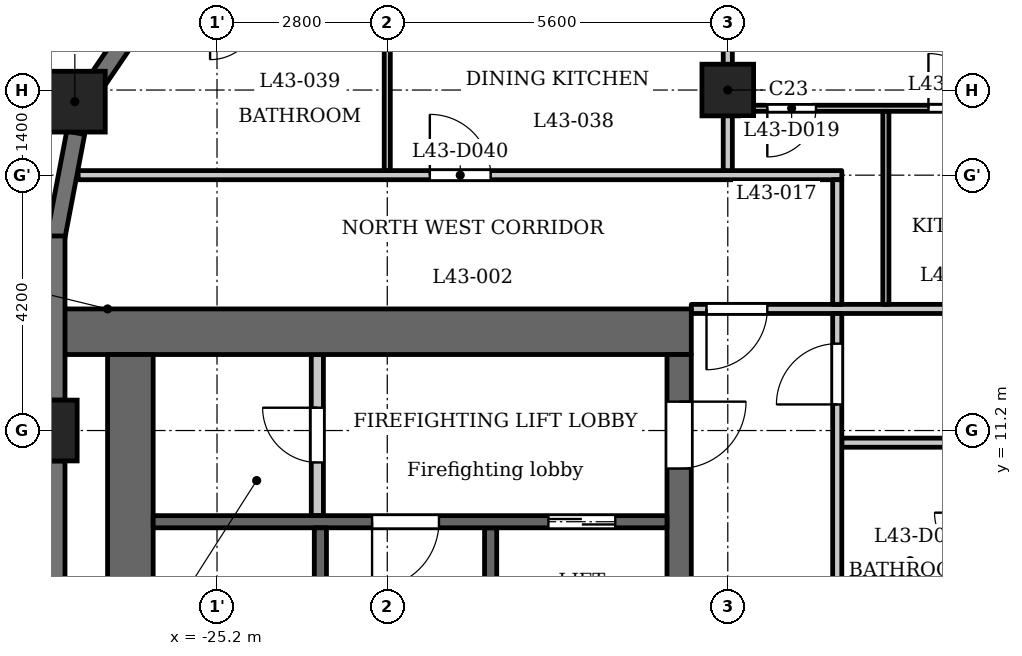
"""IFC4 building model, lengths in metres.
Left out: names, types, materials, properties, quantities, classifications, styles, units other than length and angle.
Written with IfcOpenShell. Run it as: python <this file> out.ifc"""

import sys

from ifc_helpers import new_model, si_unit, direction, frame, frame_2d, origin, origin_2d, place, context, subcontext, project, spatial, rectangle, extrude, element, fill, save


model = new_model("IFC4")
c1 = context("Model", 3, precision=1e-05, world=origin(), true_north=direction((0.0, 1.0)))
c2 = subcontext(c1, "Body", "Model", "MODEL_VIEW")
j1 = project(units=[si_unit("LENGTHUNIT", "METRE"), si_unit("PLANEANGLEUNIT", "RADIAN")], contexts=[c1])
p1 = place(None, origin())
s1 = spatial("IfcSite", under=j1, at=p1, CompositionType="ELEMENT")
p2 = place(p1, origin())
s2 = spatial("IfcBuilding", under=s1, at=p2, CompositionType="ELEMENT")
p3 = place(p2, frame((0.0, 0.0, 167.6)))
s3 = spatial("IfcBuildingStorey", under=s2, at=p3, CompositionType="ELEMENT", Elevation=167.6)
for number, where, z_axis, x_axis in (
    (1, (-27.538, 16.609, 0.0), (0.0, 0.0, 1.0), (1.0, 0.0, 0.0)),
    (2, (-28.0, 11.2, 0.0), (0.0, 0.0, 1.0), (1.0, 0.0, 0.0)),
):
    element("IfcColumn", number, at=place(p3, frame(where, z_axis=z_axis, x_axis=x_axis)), inside=s3, PredefinedType="COLUMN", context=c2, shape_type="SweptSolid", body=[
        extrude(rectangle(XDim=1.0, YDim=1.0, at=origin_2d()), origin(), (0.0, 0.0, 1.0), 3.5),
    ])
p4 = place(p3, frame((-16.8, 16.8, 0.0), z_axis=(0.0, 0.0, 1.0), x_axis=(1.0, 0.0, 0.0)))
e3 = element("IfcColumn", 3, at=p4, inside=s3, PredefinedType="COLUMN", context=c2, shape_type="SweptSolid", body=[
    extrude(rectangle(XDim=0.85, YDim=0.85, at=origin_2d()), origin(), (0.0, 0.0, 1.0), 3.5),
])
p5 = place(p3, frame((-26.504, 17.934, 0.0), z_axis=(0.0, 0.0, 1.0), x_axis=(-0.562145470373, -0.827038372833, 0.0)))
e4 = element("IfcWall", 4, at=p5, inside=s3, PredefinedType="SOLIDWALL", context=c2, shape_type="SweptSolid", body=[
    extrude(rectangle(XDim=1.177, YDim=0.3, at=frame_2d((0.588, 0.0))), origin(), (0.0, 0.0, 1.0), 3.2),
])
p6 = place(p3, frame((-27.524, 16.097, 0.0), z_axis=(0.0, 0.0, 1.0), x_axis=(-0.187259034321, -0.982310569049, 0.0)))
e5 = element("IfcWall", 5, at=p6, inside=s3, PredefinedType="SOLIDWALL", context=c2, shape_type="SweptSolid", body=[
    extrude(rectangle(XDim=1.756, YDim=0.3, at=frame_2d((0.878, 0.0))), origin(), (0.0, 0.0, 1.0), 2.45),
])
p7 = place(p3, frame((-27.85, 14.4, 0.0), z_axis=(0.0, 0.0, 1.0), x_axis=(0.0, -1.0, 0.0)))
e6 = element("IfcWall", 6, at=p7, inside=s3, PredefinedType="SOLIDWALL", context=c2, shape_type="SweptSolid", body=[
    extrude(rectangle(XDim=2.7, YDim=0.3, at=frame_2d((1.35, 0.0))), origin(), (0.0, 0.0, 1.0), 2.45),
])
p8 = place(p3, frame((-27.85, 10.7, 0.0), z_axis=(0.0, 0.0, 1.0), x_axis=(0.0, -1.0, 0.0)))
e7 = element("IfcWall", 7, at=p8, inside=s3, PredefinedType="SOLIDWALL", context=c2, shape_type="SweptSolid", body=[
    extrude(rectangle(XDim=4.6, YDim=0.3, at=frame_2d((2.3, 0.0))), origin(), (0.0, 0.0, 1.0), 2.45),
])
p9 = place(p3, frame((-20.7, 2.6, 0.0), z_axis=(0.0, 0.0, 1.0), x_axis=(0.0, 1.0, 0.0)))
e8 = element("IfcWall", 8, at=p9, inside=s3, PredefinedType="SHEAR", context=c2, shape_type="SweptSolid", body=[
    extrude(rectangle(XDim=7.0, YDim=0.2, at=frame_2d((3.5, 0.0))), origin(), (0.0, 0.0, 1.0), 3.2),
])
p10 = place(p3, frame((-17.4, 12.825, 0.0), z_axis=(0.0, 0.0, 1.0), x_axis=(-1.0, 0.0, 0.0)))
e9 = element("IfcWall", 9, at=p10, inside=s3, PredefinedType="SHEAR", context=c2, shape_type="SweptSolid", body=[
    extrude(rectangle(XDim=10.4, YDim=0.75, at=frame_2d((5.2, 0.0))), origin(), (0.0, 0.0, 1.0), 3.2),
])
p11 = place(p3, frame((-17.6, -12.45, 0.0), z_axis=(0.0, 0.0, 1.0), x_axis=(0.0, 1.0, 0.0)))
e10 = element("IfcWall", 10, at=p11, inside=s3, PredefinedType="SHEAR", context=c2, shape_type="SweptSolid", body=[
    extrude(rectangle(XDim=24.9, YDim=0.4, at=frame_2d((12.45, 0.0))), origin(), (0.0, 0.0, 1.0), 3.2),
])
p12 = place(p11, frame((8.65, 0.0, 0.0)))
e11 = element("IfcOpeningElement", 11, at=p12, cuts=e10, PredefinedType="OPENING", context=c2, shape_type="SweptSolid", body=[
    extrude(rectangle(XDim=0.9, YDim=2.1, at=frame_2d((0.45, 1.05))), frame((0.0, 0.21, 0.0), z_axis=(0.0, -1.0, 0.0), x_axis=(1.0, 0.0, 0.0)), (0.0, 0.0, 1.0), 0.42),
])
p13 = place(p11, frame((15.6, 0.0, 0.0)))
e12 = element("IfcOpeningElement", 12, at=p13, cuts=e10, PredefinedType="OPENING", context=c2, shape_type="SweptSolid", body=[
    extrude(rectangle(XDim=1.1, YDim=2.1, at=frame_2d((0.55, 1.05))), frame((0.0, 0.21, 0.0), z_axis=(0.0, -1.0, 0.0), x_axis=(1.0, 0.0, 0.0)), (0.0, 0.0, 1.0), 0.42),
])
p14 = place(p11, frame((18.0, 0.0, 0.0)))
e13 = element("IfcOpeningElement", 13, at=p14, cuts=e10, PredefinedType="OPENING", context=c2, shape_type="SweptSolid", body=[
    extrude(rectangle(XDim=1.1, YDim=2.1, at=frame_2d((0.55, 1.05))), frame((0.0, 0.21, 0.0), z_axis=(0.0, -1.0, 0.0), x_axis=(1.0, 0.0, 0.0)), (0.0, 0.0, 1.0), 0.42),
])
p15 = place(p11, frame((23.025, 0.0, 0.0)))
e14 = element("IfcOpeningElement", 14, at=p15, cuts=e10, PredefinedType="OPENING", context=c2, shape_type="SweptSolid", body=[
    extrude(rectangle(XDim=1.1, YDim=2.1, at=frame_2d((0.55, 1.05))), frame((0.0, 0.21, 0.0), z_axis=(0.0, -1.0, 0.0), x_axis=(1.0, 0.0, 0.0)), (0.0, 0.0, 1.0), 0.42),
])
p16 = place(p11, frame((0.775, 0.0, 0.0)))
e15 = element("IfcOpeningElement", 15, at=p16, cuts=e10, PredefinedType="OPENING", context=c2, shape_type="SweptSolid", body=[
    extrude(rectangle(XDim=1.1, YDim=2.1, at=frame_2d((0.55, 1.05))), frame((0.0, 0.21, 0.0), z_axis=(0.0, -1.0, 0.0), x_axis=(1.0, 0.0, 0.0)), (0.0, 0.0, 1.0), 0.42),
])
p17 = place(p11, frame((12.925, 0.0, 0.0)))
e16 = element("IfcOpeningElement", 16, at=p17, cuts=e10, PredefinedType="OPENING", context=c2, shape_type="SweptSolid", body=[
    extrude(rectangle(XDim=1.8, YDim=2.1, at=frame_2d((0.9, 1.05))), frame((0.0, 0.21, 0.0), z_axis=(0.0, -1.0, 0.0), x_axis=(1.0, 0.0, 0.0)), (0.0, 0.0, 1.0), 0.42),
])
p18 = place(p3, frame((-26.625, -12.45, 0.0), z_axis=(0.0, 0.0, 1.0), x_axis=(0.0, 1.0, 0.0)))
e17 = element("IfcWall", 17, at=p18, inside=s3, PredefinedType="SHEAR", context=c2, shape_type="SweptSolid", body=[
    extrude(rectangle(XDim=24.9, YDim=0.75, at=frame_2d((12.45, 0.0))), origin(), (0.0, 0.0, 1.0), 3.2),
])
p19 = place(p3, frame((-23.55, 9.8, 0.0), z_axis=(0.0, 0.0, 1.0), x_axis=(0.0, 1.0, 0.0)))
e18 = element("IfcWall", 18, at=p19, inside=s3, PredefinedType="PARTITIONING", context=c2, shape_type="SweptSolid", body=[
    extrude(rectangle(XDim=2.65, YDim=0.2, at=frame_2d((1.325, 0.0))), origin(), (0.0, 0.0, 1.0), 3.2),
])
p20 = place(p19, frame((0.875, 0.0, 0.0)))
e19 = element("IfcOpeningElement", 19, at=p20, cuts=e18, PredefinedType="OPENING", context=c2, shape_type="SweptSolid", body=[
    extrude(rectangle(XDim=0.9, YDim=2.1, at=frame_2d((0.45, 1.05))), frame((0.0, 0.11, 0.0), z_axis=(0.0, -1.0, 0.0), x_axis=(1.0, 0.0, 0.0)), (0.0, 0.0, 1.0), 0.22),
])
p21 = place(p3, frame((-17.8, 9.7, 0.0), z_axis=(0.0, 0.0, 1.0), x_axis=(-1.0, 0.0, 0.0)))
e20 = element("IfcWall", 20, at=p21, inside=s3, PredefinedType="SHEAR", context=c2, shape_type="SweptSolid", body=[
    extrude(rectangle(XDim=8.45, YDim=0.2, at=frame_2d((4.225, 0.0))), origin(), (0.0, 0.0, 1.0), 3.2),
])
p22 = place(p21, frame((0.85, 0.0, 0.0)))
e21 = element("IfcOpeningElement", 21, at=p22, cuts=e20, PredefinedType="OPENING", context=c2, shape_type="SweptSolid", body=[
    extrude(rectangle(XDim=1.1, YDim=2.1, at=frame_2d((0.55, 1.05))), frame((0.0, 0.11, 0.0), z_axis=(0.0, -1.0, 0.0), x_axis=(1.0, 0.0, 0.0)), (0.0, 0.0, 1.0), 0.22),
])
p23 = place(p21, frame((3.75, 0.0, 0.0)))
e22 = element("IfcOpeningElement", 22, at=p23, cuts=e20, PredefinedType="OPENING", context=c2, shape_type="SweptSolid", body=[
    extrude(rectangle(XDim=1.1, YDim=2.1, at=frame_2d((0.55, 1.05))), frame((0.0, 0.11, 0.0), z_axis=(0.0, -1.0, 0.0), x_axis=(1.0, 0.0, 0.0)), (0.0, 0.0, 1.0), 0.22),
])
p24 = place(p3, frame((-23.5, 2.6, 0.0), z_axis=(0.0, 0.0, 1.0), x_axis=(0.0, 1.0, 0.0)))
e23 = element("IfcWall", 23, at=p24, inside=s3, PredefinedType="SHEAR", context=c2, shape_type="SweptSolid", body=[
    extrude(rectangle(XDim=7.0, YDim=0.2, at=frame_2d((3.5, 0.0))), origin(), (0.0, 0.0, 1.0), 3.2),
])
p25 = place(p3, frame((-14.925, 11.0, 0.0), z_axis=(0.0, 0.0, 1.0), x_axis=(1.0, 0.0, 0.0)))
e24 = element("IfcWall", 24, at=p25, inside=s3, PredefinedType="PARTITIONING", context=c2, shape_type="SweptSolid", body=[
    extrude(rectangle(XDim=29.85, YDim=0.15, at=frame_2d((14.925, 0.0))), origin(), (0.0, 0.0, 1.0), 3.2),
])
p26 = place(p25, frame((2.475, 0.0, 0.0)))
e25 = element("IfcOpeningElement", 25, at=p26, cuts=e24, PredefinedType="OPENING", context=c2, shape_type="SweptSolid", body=[
    extrude(rectangle(XDim=1.0, YDim=2.1, at=frame_2d((0.5, 1.05))), frame((0.0, 0.085, 0.0), z_axis=(0.0, -1.0, 0.0), x_axis=(1.0, 0.0, 0.0)), (0.0, 0.0, 1.0), 0.17),
])
p27 = place(p25, frame((26.275, 0.0, 0.0)))
e26 = element("IfcOpeningElement", 26, at=p27, cuts=e24, PredefinedType="OPENING", context=c2, shape_type="SweptSolid", body=[
    extrude(rectangle(XDim=1.0, YDim=2.1, at=frame_2d((0.5, 1.05))), frame((0.0, 0.085, 0.0), z_axis=(0.0, -1.0, 0.0), x_axis=(1.0, 0.0, 0.0)), (0.0, 0.0, 1.0), 0.17),
])
p28 = place(p3, frame((-17.4, 13.2, 0.0), z_axis=(0.0, 0.0, 1.0), x_axis=(1.0, 0.0, 0.0)))
e27 = element("IfcWall", 27, at=p28, inside=s3, PredefinedType="PARTITIONING", context=c2, shape_type="SweptSolid", body=[
    extrude(rectangle(XDim=34.8, YDim=0.15, at=frame_2d((17.4, 0.0))), origin(), (0.0, 0.0, 1.0), 3.2),
])
p29 = place(p28, frame((0.25, 0.0, 0.0)))
e28 = element("IfcOpeningElement", 28, at=p29, cuts=e27, PredefinedType="OPENING", context=c2, shape_type="SweptSolid", body=[
    extrude(rectangle(XDim=1.0, YDim=2.1, at=frame_2d((0.5, 1.05))), frame((0.0, 0.085, 0.0), z_axis=(0.0, -1.0, 0.0), x_axis=(1.0, 0.0, 0.0)), (0.0, 0.0, 1.0), 0.17),
])
p30 = place(p28, frame((33.65, 0.0, 0.0)))
e29 = element("IfcOpeningElement", 29, at=p30, cuts=e27, PredefinedType="OPENING", context=c2, shape_type="SweptSolid", body=[
    extrude(rectangle(XDim=1.0, YDim=2.1, at=frame_2d((0.5, 1.05))), frame((0.0, 0.085, 0.0), z_axis=(0.0, -1.0, 0.0), x_axis=(1.0, 0.0, 0.0)), (0.0, 0.0, 1.0), 0.17),
])
p31 = place(p28, frame((10.15, 0.0, 0.0)))
e30 = element("IfcOpeningElement", 30, at=p31, cuts=e27, PredefinedType="OPENING", context=c2, shape_type="SweptSolid", body=[
    extrude(rectangle(XDim=1.0, YDim=2.1, at=frame_2d((0.5, 1.05))), frame((0.0, 0.085, 0.0), z_axis=(0.0, -1.0, 0.0), x_axis=(1.0, 0.0, 0.0)), (0.0, 0.0, 1.0), 0.17),
])
p32 = place(p28, frame((15.75, 0.0, 0.0)))
e31 = element("IfcOpeningElement", 31, at=p32, cuts=e27, PredefinedType="OPENING", context=c2, shape_type="SweptSolid", body=[
    extrude(rectangle(XDim=1.0, YDim=2.1, at=frame_2d((0.5, 1.05))), frame((0.0, 0.085, 0.0), z_axis=(0.0, -1.0, 0.0), x_axis=(1.0, 0.0, 0.0)), (0.0, 0.0, 1.0), 0.17),
])
p33 = place(p28, frame((24.95, 0.0, 0.0)))
e32 = element("IfcOpeningElement", 32, at=p33, cuts=e27, PredefinedType="OPENING", context=c2, shape_type="SweptSolid", body=[
    extrude(rectangle(XDim=1.0, YDim=2.1, at=frame_2d((0.5, 1.05))), frame((0.0, 0.085, 0.0), z_axis=(0.0, -1.0, 0.0), x_axis=(1.0, 0.0, 0.0)), (0.0, 0.0, 1.0), 0.17),
])
p34 = place(p28, frame((29.95, 0.0, 0.0)))
e33 = element("IfcOpeningElement", 33, at=p34, cuts=e27, PredefinedType="OPENING", context=c2, shape_type="SweptSolid", body=[
    extrude(rectangle(XDim=1.0, YDim=2.1, at=frame_2d((0.5, 1.05))), frame((0.0, 0.085, 0.0), z_axis=(0.0, -1.0, 0.0), x_axis=(1.0, 0.0, 0.0)), (0.0, 0.0, 1.0), 0.17),
])
p35 = place(p3, frame((-27.484, 15.4, 0.0), z_axis=(0.0, 0.0, 1.0), x_axis=(1.0, 0.0, 0.0)))
e34 = element("IfcWall", 34, at=p35, inside=s3, PredefinedType="PARTITIONING", context=c2, shape_type="SweptSolid", body=[
    extrude(rectangle(XDim=12.559, YDim=0.15, at=frame_2d((6.279, 0.0))), origin(), (0.0, 0.0, 1.0), 3.2),
])
p36 = place(p35, frame((5.784, 0.0, 0.0)))
e35 = element("IfcOpeningElement", 35, at=p36, cuts=e34, PredefinedType="OPENING", context=c2, shape_type="SweptSolid", body=[
    extrude(rectangle(XDim=1.0, YDim=2.1, at=frame_2d((0.5, 1.05))), frame((0.0, 0.085, 0.0), z_axis=(0.0, -1.0, 0.0), x_axis=(1.0, 0.0, 0.0)), (0.0, 0.0, 1.0), 0.17),
])
p37 = place(p3, frame((-16.725, 16.5, 0.0), z_axis=(0.0, 0.0, 1.0), x_axis=(1.0, 0.0, 0.0)))
e36 = element("IfcWall", 36, at=p37, inside=s3, PredefinedType="PARTITIONING", context=c2, shape_type="SweptSolid", body=[
    extrude(rectangle(XDim=33.45, YDim=0.1, at=frame_2d((16.725, 0.0))), origin(), (0.0, 0.0, 1.0), 3.2),
])
p38 = place(p37, frame((0.575, 0.0, 0.0)))
e37 = element("IfcOpeningElement", 37, at=p38, cuts=e36, PredefinedType="OPENING", context=c2, shape_type="SweptSolid", body=[
    extrude(rectangle(XDim=0.8, YDim=2.1, at=frame_2d((0.4, 1.05))), frame((0.0, 0.06, 0.0), z_axis=(0.0, -1.0, 0.0), x_axis=(1.0, 0.0, 0.0)), (0.0, 0.0, 1.0), 0.12),
])
p39 = place(p37, frame((3.225, 0.0, 0.0)))
e38 = element("IfcOpeningElement", 38, at=p39, cuts=e36, PredefinedType="OPENING", context=c2, shape_type="SweptSolid", body=[
    extrude(rectangle(XDim=0.9, YDim=2.1, at=frame_2d((0.45, 1.05))), frame((0.0, 0.06, 0.0), z_axis=(0.0, -1.0, 0.0), x_axis=(1.0, 0.0, 0.0)), (0.0, 0.0, 1.0), 0.12),
])
p40 = place(p37, frame((6.775, 0.0, 0.0)))
e39 = element("IfcOpeningElement", 39, at=p40, cuts=e36, PredefinedType="OPENING", context=c2, shape_type="SweptSolid", body=[
    extrude(rectangle(XDim=0.9, YDim=2.1, at=frame_2d((0.45, 1.05))), frame((0.0, 0.06, 0.0), z_axis=(0.0, -1.0, 0.0), x_axis=(1.0, 0.0, 0.0)), (0.0, 0.0, 1.0), 0.12),
])
p41 = place(p37, frame((8.825, 0.0, 0.0)))
e40 = element("IfcOpeningElement", 40, at=p41, cuts=e36, PredefinedType="OPENING", context=c2, shape_type="SweptSolid", body=[
    extrude(rectangle(XDim=0.9, YDim=2.1, at=frame_2d((0.45, 1.05))), frame((0.0, 0.06, 0.0), z_axis=(0.0, -1.0, 0.0), x_axis=(1.0, 0.0, 0.0)), (0.0, 0.0, 1.0), 0.12),
])
p42 = place(p37, frame((20.775, 0.0, 0.0)))
e41 = element("IfcOpeningElement", 41, at=p42, cuts=e36, PredefinedType="OPENING", context=c2, shape_type="SweptSolid", body=[
    extrude(rectangle(XDim=0.8, YDim=2.1, at=frame_2d((0.4, 1.05))), frame((0.0, 0.06, 0.0), z_axis=(0.0, -1.0, 0.0), x_axis=(1.0, 0.0, 0.0)), (0.0, 0.0, 1.0), 0.12),
])
p43 = place(p37, frame((17.325, 0.0, 0.0)))
e42 = element("IfcOpeningElement", 42, at=p43, cuts=e36, PredefinedType="OPENING", context=c2, shape_type="SweptSolid", body=[
    extrude(rectangle(XDim=0.9, YDim=2.1, at=frame_2d((0.45, 1.05))), frame((0.0, 0.06, 0.0), z_axis=(0.0, -1.0, 0.0), x_axis=(1.0, 0.0, 0.0)), (0.0, 0.0, 1.0), 0.12),
])
p44 = place(p37, frame((12.375, 0.0, 0.0)))
e43 = element("IfcOpeningElement", 43, at=p44, cuts=e36, PredefinedType="OPENING", context=c2, shape_type="SweptSolid", body=[
    extrude(rectangle(XDim=0.9, YDim=2.1, at=frame_2d((0.45, 1.05))), frame((0.0, 0.06, 0.0), z_axis=(0.0, -1.0, 0.0), x_axis=(1.0, 0.0, 0.0)), (0.0, 0.0, 1.0), 0.12),
])
p45 = place(p37, frame((14.425, 0.0, 0.0)))
e44 = element("IfcOpeningElement", 44, at=p45, cuts=e36, PredefinedType="OPENING", context=c2, shape_type="SweptSolid", body=[
    extrude(rectangle(XDim=0.9, YDim=2.1, at=frame_2d((0.45, 1.05))), frame((0.0, 0.06, 0.0), z_axis=(0.0, -1.0, 0.0), x_axis=(1.0, 0.0, 0.0)), (0.0, 0.0, 1.0), 0.12),
])
p46 = place(p37, frame((26.575, 0.0, 0.0)))
e45 = element("IfcOpeningElement", 45, at=p46, cuts=e36, PredefinedType="OPENING", context=c2, shape_type="SweptSolid", body=[
    extrude(rectangle(XDim=0.8, YDim=2.1, at=frame_2d((0.4, 1.05))), frame((0.0, 0.06, 0.0), z_axis=(0.0, -1.0, 0.0), x_axis=(1.0, 0.0, 0.0)), (0.0, 0.0, 1.0), 0.12),
])
p47 = place(p37, frame((23.775, 0.0, 0.0)))
e46 = element("IfcOpeningElement", 46, at=p47, cuts=e36, PredefinedType="OPENING", context=c2, shape_type="SweptSolid", body=[
    extrude(rectangle(XDim=0.9, YDim=2.1, at=frame_2d((0.45, 1.05))), frame((0.0, 0.06, 0.0), z_axis=(0.0, -1.0, 0.0), x_axis=(1.0, 0.0, 0.0)), (0.0, 0.0, 1.0), 0.12),
])
p48 = place(p37, frame((32.075, 0.0, 0.0)))
e47 = element("IfcOpeningElement", 47, at=p48, cuts=e36, PredefinedType="OPENING", context=c2, shape_type="SweptSolid", body=[
    extrude(rectangle(XDim=0.8, YDim=2.1, at=frame_2d((0.4, 1.05))), frame((0.0, 0.06, 0.0), z_axis=(0.0, -1.0, 0.0), x_axis=(1.0, 0.0, 0.0)), (0.0, 0.0, 1.0), 0.12),
])
p49 = place(p37, frame((29.375, 0.0, 0.0)))
e48 = element("IfcOpeningElement", 48, at=p49, cuts=e36, PredefinedType="OPENING", context=c2, shape_type="SweptSolid", body=[
    extrude(rectangle(XDim=0.9, YDim=2.1, at=frame_2d((0.45, 1.05))), frame((0.0, 0.06, 0.0), z_axis=(0.0, -1.0, 0.0), x_axis=(1.0, 0.0, 0.0)), (0.0, 0.0, 1.0), 0.12),
])
p50 = place(p3, frame((-22.4, 15.475, 0.0), z_axis=(0.0, 0.0, 1.0), x_axis=(0.0, 1.0, 0.0)))
e49 = element("IfcWall", 49, at=p50, inside=s3, PredefinedType="PARTITIONING", context=c2, shape_type="SweptSolid", body=[
    extrude(rectangle(XDim=2.575, YDim=0.1, at=frame_2d((1.288, 0.0))), origin(), (0.0, 0.0, 1.0), 3.2),
])
p51 = place(p3, frame((-16.8, 15.475, 0.0), z_axis=(0.0, 0.0, 1.0), x_axis=(0.0, 1.0, 0.0)))
e50 = element("IfcWall", 50, at=p51, inside=s3, PredefinedType="PARTITIONING", context=c2, shape_type="SweptSolid", body=[
    extrude(rectangle(XDim=7.405, YDim=0.15, at=frame_2d((3.702, 0.0))), origin(), (0.0, 0.0, 1.0), 3.2),
])
p52 = place(p3, frame((-15.0, 6.769, 0.0), z_axis=(0.0, 0.0, 1.0), x_axis=(0.0, 1.0, 0.0)))
e51 = element("IfcWall", 51, at=p52, inside=s3, PredefinedType="PARTITIONING", context=c2, shape_type="SweptSolid", body=[
    extrude(rectangle(XDim=6.356, YDim=0.15, at=frame_2d((3.178, 0.0))), origin(), (0.0, 0.0, 1.0), 3.2),
])
p53 = place(p52, frame((4.86, 0.0, 0.0)))
e52 = element("IfcOpeningElement", 52, at=p53, cuts=e51, PredefinedType="OPENING", context=c2, shape_type="SweptSolid", body=[
    extrude(rectangle(XDim=1.0, YDim=2.1, at=frame_2d((0.5, 1.05))), frame((0.0, 0.085, 0.0), z_axis=(0.0, -1.0, 0.0), x_axis=(1.0, 0.0, 0.0)), (0.0, 0.0, 1.0), 0.17),
])
p54 = place(p3, frame((-15.0, 13.275, 0.0), z_axis=(0.0, 0.0, 1.0), x_axis=(0.0, 1.0, 0.0)))
e53 = element("IfcWall", 53, at=p54, inside=s3, PredefinedType="PARTITIONING", context=c2, shape_type="SweptSolid", body=[
    extrude(rectangle(XDim=2.05, YDim=0.15, at=frame_2d((1.025, 0.0))), origin(), (0.0, 0.0, 1.0), 3.2),
])
p55 = place(p3, frame((-14.2, 13.275, 0.0), z_axis=(0.0, 0.0, 1.0), x_axis=(0.0, 1.0, 0.0)))
e54 = element("IfcWall", 54, at=p55, inside=s3, PredefinedType="PARTITIONING", context=c2, shape_type="SweptSolid", body=[
    extrude(rectangle(XDim=3.175, YDim=0.1, at=frame_2d((1.587, 0.0))), origin(), (0.0, 0.0, 1.0), 3.2),
])
p56 = place(p22, origin())
e55 = element("IfcDoor", 55, at=p56, inside=s3, OperationType="DOUBLE_DOOR_SLIDING", PredefinedType="DOOR", context=c2, shape_type="SweptSolid", body=[
    extrude(rectangle(XDim=1.1, YDim=2.1, at=frame_2d((0.55, 1.05))), frame((0.0, 0.025, 0.0), z_axis=(0.0, -1.0, 0.0), x_axis=(1.0, 0.0, 0.0)), (0.0, 0.0, 1.0), 0.05),
])
fill(e21, e55)
p57 = place(p15, origin())
e56 = element("IfcDoor", 56, at=p57, inside=s3, OperationType="SINGLE_SWING_RIGHT", PredefinedType="DOOR", context=c2, shape_type="SweptSolid", body=[
    extrude(rectangle(XDim=1.1, YDim=2.1, at=frame_2d((0.55, 1.05))), frame((0.0, 0.025, 0.0), z_axis=(0.0, -1.0, 0.0), x_axis=(1.0, 0.0, 0.0)), (0.0, 0.0, 1.0), 0.05),
])
fill(e14, e56)
p58 = place(p20, origin())
e57 = element("IfcDoor", 57, at=p58, inside=s3, OperationType="SINGLE_SWING_LEFT", PredefinedType="DOOR", context=c2, shape_type="SweptSolid", body=[
    extrude(rectangle(XDim=0.9, YDim=2.1, at=frame_2d((0.45, 1.05))), frame((0.0, 0.025, 0.0), z_axis=(0.0, -1.0, 0.0), x_axis=(1.0, 0.0, 0.0)), (0.0, 0.0, 1.0), 0.05),
])
fill(e19, e57)
p59 = place(p23, origin())
e58 = element("IfcDoor", 58, at=p59, inside=s3, OperationType="SINGLE_SWING_LEFT", PredefinedType="DOOR", context=c2, shape_type="SweptSolid", body=[
    extrude(rectangle(XDim=1.1, YDim=2.1, at=frame_2d((0.55, 1.05))), frame((0.0, 0.025, 0.0), z_axis=(0.0, -1.0, 0.0), x_axis=(1.0, 0.0, 0.0)), (0.0, 0.0, 1.0), 0.05),
])
fill(e22, e58)
p60 = place(p53, origin())
e59 = element("IfcDoor", 59, at=p60, inside=s3, OperationType="SINGLE_SWING_RIGHT", PredefinedType="DOOR", context=c2, shape_type="SweptSolid", body=[
    extrude(rectangle(XDim=1.0, YDim=2.1, at=frame_2d((0.5, 1.05))), frame((0.0, 0.025, 0.0), z_axis=(0.0, -1.0, 0.0), x_axis=(1.0, 0.0, 0.0)), (0.0, 0.0, 1.0), 0.05),
])
fill(e52, e59)
p61 = place(p29, origin())
e60 = element("IfcDoor", 60, at=p61, inside=s3, OperationType="SINGLE_SWING_LEFT", PredefinedType="DOOR", context=c2, shape_type="SweptSolid", body=[
    extrude(rectangle(XDim=1.0, YDim=2.1, at=frame_2d((0.5, 1.05))), frame((0.0, 0.025, 0.0), z_axis=(0.0, -1.0, 0.0), x_axis=(1.0, 0.0, 0.0)), (0.0, 0.0, 1.0), 0.05),
])
fill(e28, e60)
p62 = place(p38, origin())
e61 = element("IfcDoor", 61, at=p62, inside=s3, OperationType="SINGLE_SWING_LEFT", PredefinedType="DOOR", context=c2, shape_type="SweptSolid", body=[
    extrude(rectangle(XDim=0.8, YDim=2.1, at=frame_2d((0.4, 1.05))), frame((0.0, 0.025, 0.0), z_axis=(0.0, -1.0, 0.0), x_axis=(1.0, 0.0, 0.0)), (0.0, 0.0, 1.0), 0.05),
])
fill(e37, e61)
p63 = place(p39, origin())
e62 = element("IfcDoor", 62, at=p63, inside=s3, OperationType="SINGLE_SWING_RIGHT", PredefinedType="DOOR", context=c2, shape_type="SweptSolid", body=[
    extrude(rectangle(XDim=0.9, YDim=2.1, at=frame_2d((0.45, 1.05))), frame((0.0, 0.025, 0.0), z_axis=(0.0, -1.0, 0.0), x_axis=(1.0, 0.0, 0.0)), (0.0, 0.0, 1.0), 0.05),
])
fill(e38, e62)
p64 = place(p36, origin())
e63 = element("IfcDoor", 63, at=p64, inside=s3, OperationType="SINGLE_SWING_RIGHT", PredefinedType="DOOR", context=c2, shape_type="SweptSolid", body=[
    extrude(rectangle(XDim=1.0, YDim=2.1, at=frame_2d((0.5, 1.05))), frame((0.0, 0.025, 0.0), z_axis=(0.0, -1.0, 0.0), x_axis=(1.0, 0.0, 0.0)), (0.0, 0.0, 1.0), 0.05),
])
fill(e35, e63)
save(model, sys.argv[1])
